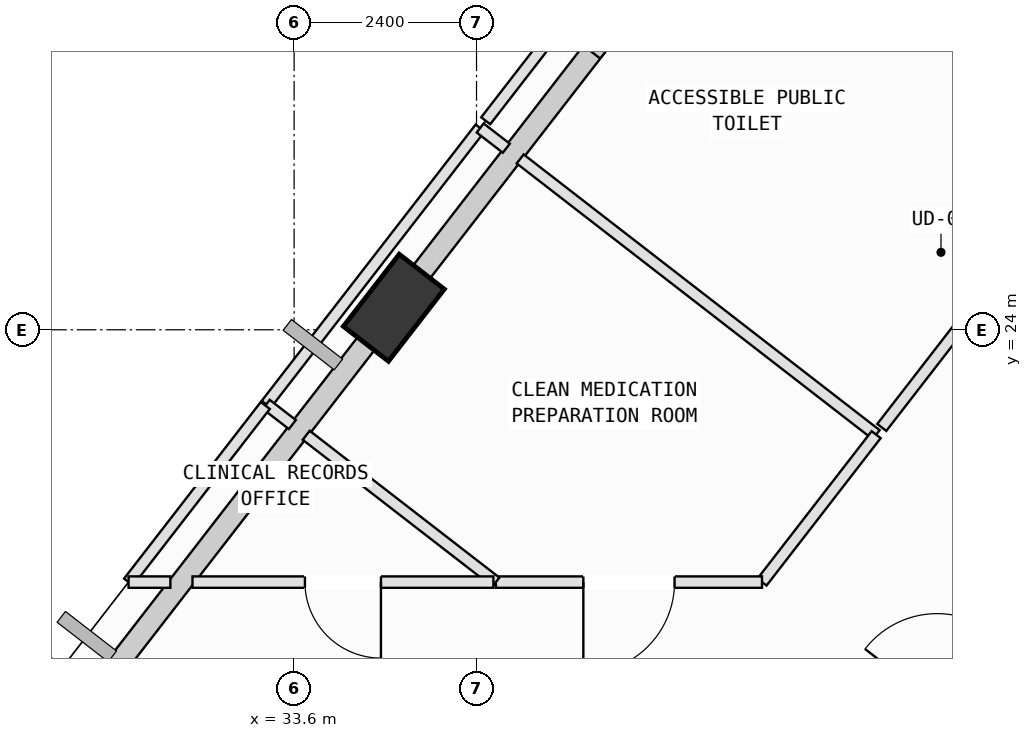
"""IFC4 building model, lengths in metres.
Left out: names, types, materials, properties, quantities, classifications, styles, units other than length and angle.
Written with IfcOpenShell. Run it as: python <this file> out.ifc"""

import sys

from ifc_helpers import new_model, si_unit, direction, frame, frame_2d, origin, origin_2d, place, context, subcontext, project, spatial, rectangle, extrude, element, fill, save


model = new_model("IFC4")
c1 = context("Model", 3, precision=1e-05, world=origin(), true_north=direction((0.0, 1.0)))
c2 = subcontext(c1, "Body", "Model", "MODEL_VIEW")
j1 = project(units=[si_unit("LENGTHUNIT", "METRE"), si_unit("PLANEANGLEUNIT", "RADIAN")], contexts=[c1])
p1 = place(None, origin())
s1 = spatial("IfcSite", under=j1, at=p1, CompositionType="ELEMENT")
p2 = place(p1, origin())
s2 = spatial("IfcBuilding", under=s1, at=p2, CompositionType="ELEMENT")
p3 = place(p2, frame((0.0, 0.0, 247.2)))
s3 = spatial("IfcBuildingStorey", under=s2, at=p3, CompositionType="ELEMENT", Elevation=247.2)
p4 = place(p3, frame((34.912, 24.29, 0.002), z_axis=(0.00207706177, 0.005437014634, 0.9999830622), x_axis=(-0.854072816538, -0.52013310368, 0.00460201124)))
e1 = element("IfcColumn", 1, at=p4, inside=s3, PredefinedType="COLUMN", context=c2, shape_type="SweptSolid", body=[
    extrude(rectangle(XDim=1.2, YDim=0.75, at=origin_2d()), origin(), (0.0, 0.0, 1.0), 3.996),
])
p5 = place(p3, frame((35.163, 24.613, 0.0), z_axis=(0.0, 0.0, 1.0), x_axis=(0.612185484871, 0.790714191167, 0.0)))
e2 = element("IfcWall", 2, at=p5, inside=s3, PredefinedType="SOLIDWALL", context=c2, shape_type="SweptSolid", body=[
    extrude(rectangle(XDim=6.409, YDim=0.28, at=frame_2d((3.205, 0.0))), origin(), (0.0, 0.0, 1.0), 3.265),
])
p6 = place(p5, frame((3.847, 0.0, 0.75)))
e3 = element("IfcOpeningElement", 3, at=p6, cuts=e2, PredefinedType="OPENING", context=c2, shape_type="SweptSolid", body=[
    extrude(rectangle(XDim=1.2, YDim=1.75, at=frame_2d((0.6, 0.875))), frame((0.0, 0.15, 0.0), z_axis=(0.0, -1.0, 0.0), x_axis=(1.0, 0.0, 0.0)), (0.0, 0.0, 1.0), 0.3),
])
p7 = place(p3, frame((30.906, 19.115, 0.0), z_axis=(0.0, 0.0, 1.0), x_axis=(0.612215569716, 0.790690898011, 0.0)))
e4 = element("IfcWall", 4, at=p7, inside=s3, PredefinedType="SOLIDWALL", context=c2, shape_type="SweptSolid", body=[
    extrude(rectangle(XDim=6.158, YDim=0.28, at=frame_2d((3.079, 0.0))), origin(), (0.0, 0.0, 1.0), 3.265),
])
p8 = place(p3, frame((24.885, 23.264, 0.0), z_axis=(0.0, 0.0, 1.0), x_axis=(0.790684257093, -0.612224146523, 0.0)))
e5 = element("IfcWall", 5, at=p8, inside=s3, PredefinedType="SOLIDWALL", context=c2, shape_type="SweptSolid", body=[
    extrude(rectangle(XDim=6.958, YDim=0.28, at=frame_2d((3.479, 0.0))), origin(), (0.0, 0.0, 1.0), 3.165),
])
p9 = place(p3, frame((41.099, 17.824, 0.0), z_axis=(0.0, 0.0, 1.0), x_axis=(0.612151637576, 0.790740395208, 0.0)))
e6 = element("IfcWall", 6, at=p9, inside=s3, PredefinedType="PARTITIONING", context=c2, shape_type="SweptSolid", body=[
    extrude(rectangle(XDim=4.34, YDim=0.15, at=frame_2d((2.17, 0.0))), origin(), (0.0, 0.0, 1.0), 3.78),
])
p10 = place(p9, frame((1.57, 0.0, 0.0)))
e7 = element("IfcOpeningElement", 7, at=p10, cuts=e6, PredefinedType="OPENING", context=c2, shape_type="SweptSolid", body=[
    extrude(rectangle(XDim=1.2, YDim=2.15, at=frame_2d((0.6, 1.075))), frame((0.0, 0.085, 0.0), z_axis=(0.0, -1.0, 0.0), x_axis=(1.0, 0.0, 0.0)), (0.0, 0.0, 1.0), 0.17),
])
p11 = place(p3, frame((33.233, 23.019, 0.0), z_axis=(0.0, 0.0, 1.0), x_axis=(0.612204246351, 0.790699665328, 0.0)))
e8 = element("IfcWall", 8, at=p11, inside=s3, PredefinedType="PARTITIONING", context=c2, shape_type="SweptSolid", body=[
    extrude(rectangle(XDim=4.598, YDim=0.15, at=frame_2d((2.299, 0.0))), origin(), (0.0, 0.0, 1.0), 3.78),
])
p12 = place(p3, frame((36.048, 26.655, 0.0), z_axis=(0.0, 0.0, 1.0), x_axis=(0.790951555594, -0.611878776151, 0.0)))
e9 = element("IfcWall", 9, at=p12, inside=s3, PredefinedType="PARTITIONING", context=c2, shape_type="SweptSolid", body=[
    extrude(rectangle(XDim=0.435, YDim=0.15, at=frame_2d((0.217, 0.0))), origin(), (0.0, 0.0, 1.0), 3.78),
])
p13 = place(p3, frame((36.574, 26.248, 0.0), z_axis=(0.0, 0.0, 1.0), x_axis=(0.790597576491, -0.612336077695, 0.0)))
e10 = element("IfcWall", 10, at=p13, inside=s3, PredefinedType="PARTITIONING", context=c2, shape_type="SweptSolid", body=[
    extrude(rectangle(XDim=5.925, YDim=0.15, at=frame_2d((2.962, 0.0))), origin(), (0.0, 0.0, 1.0), 3.78),
])
p14 = place(p3, frame((41.258, 22.62, 0.0), z_axis=(0.0, 0.0, 1.0), x_axis=(-0.612141082287, -0.790748566472, 0.0)))
e11 = element("IfcWall", 11, at=p14, inside=s3, PredefinedType="PARTITIONING", context=c2, shape_type="SweptSolid", body=[
    extrude(rectangle(XDim=2.454, YDim=0.15, at=frame_2d((1.227, 0.0))), origin(), (0.0, 0.0, 1.0), 3.78),
])
p15 = place(p3, frame((39.756, 20.68, 0.0), z_axis=(0.0, 0.0, 1.0), x_axis=(-1.0, 0.0, 0.0)))
e12 = element("IfcWall", 12, at=p15, inside=s3, PredefinedType="PARTITIONING", context=c2, shape_type="SweptSolid", body=[
    extrude(rectangle(XDim=3.501, YDim=0.15, at=frame_2d((1.75, 0.0))), origin(), (0.0, 0.0, 1.0), 3.415),
])
p16 = place(p15, frame((1.15, 0.0, 0.0)))
e13 = element("IfcOpeningElement", 13, at=p16, cuts=e12, PredefinedType="OPENING", context=c2, shape_type="SweptSolid", body=[
    extrude(rectangle(XDim=1.2, YDim=2.15, at=frame_2d((0.6, 1.075))), frame((0.0, 0.085, 0.0), z_axis=(0.0, -1.0, 0.0), x_axis=(1.0, 0.0, 0.0)), (0.0, 0.0, 1.0), 0.17),
])
p17 = place(p3, frame((36.255, 20.68, 0.0), z_axis=(0.0, 0.0, 1.0), x_axis=(-0.79074544755, 0.612145111211, 0.0)))
e14 = element("IfcWall", 14, at=p17, inside=s3, PredefinedType="PARTITIONING", context=c2, shape_type="SweptSolid", body=[
    extrude(rectangle(XDim=3.156, YDim=0.15, at=frame_2d((1.578, 0.0))), origin(), (0.0, 0.0, 1.0), 3.78),
])
p18 = place(p3, frame((33.577, 22.753, 0.0), z_axis=(0.0, 0.0, 1.0), x_axis=(-0.790951555594, 0.611878776151, 0.0)))
e15 = element("IfcWall", 15, at=p18, inside=s3, PredefinedType="PARTITIONING", context=c2, shape_type="SweptSolid", body=[
    extrude(rectangle(XDim=0.435, YDim=0.15, at=frame_2d((0.217, 0.0))), origin(), (0.0, 0.0, 1.0), 3.78),
])
p19 = place(p3, frame((44.147, 26.35, 0.0), z_axis=(0.0, 0.0, 1.0), x_axis=(-0.612273865453, -0.790645757393, 0.0)))
e16 = element("IfcWall", 16, at=p19, inside=s3, PredefinedType="PARTITIONING", context=c2, shape_type="SweptSolid", body=[
    extrude(rectangle(XDim=4.597, YDim=0.15, at=frame_2d((2.299, 0.0))), origin(), (0.0, 0.0, 1.0), 3.78),
])
p20 = place(p19, frame((1.839, 0.0, 0.0)))
e17 = element("IfcOpeningElement", 17, at=p20, cuts=e16, PredefinedType="OPENING", context=c2, shape_type="SweptSolid", body=[
    extrude(rectangle(XDim=0.92, YDim=2.1, at=frame_2d((0.46, 1.05))), frame((0.0, 0.085, 0.0), z_axis=(0.0, -1.0, 0.0), x_axis=(1.0, 0.0, 0.0)), (0.0, 0.0, 1.0), 0.17),
])
p21 = place(p3, frame((36.121, 26.75, 0.0), z_axis=(0.0, 0.0, 1.0), x_axis=(0.612273865453, 0.790645757393, 0.0)))
e18 = element("IfcWall", 18, at=p21, inside=s3, PredefinedType="PARTITIONING", context=c2, shape_type="SweptSolid", body=[
    extrude(rectangle(XDim=4.597, YDim=0.15, at=frame_2d((2.299, 0.0))), origin(), (0.0, 0.0, 1.0), 3.265),
])
p22 = place(p3, frame((38.936, 30.385, 0.0), z_axis=(0.0, 0.0, 1.0), x_axis=(0.790676851413, -0.6122337108, 0.0)))
e19 = element("IfcWall", 19, at=p22, inside=s3, PredefinedType="PARTITIONING", context=c2, shape_type="SweptSolid", body=[
    extrude(rectangle(XDim=6.591, YDim=0.15, at=frame_2d((3.295, 0.0))), origin(), (0.0, 0.0, 1.0), 3.78),
])
p23 = place(p3, frame((31.422, 20.68, 0.0), z_axis=(0.0, 0.0, 1.0), x_axis=(0.612092763784, 0.790785968846, 0.0)))
e20 = element("IfcWall", 20, at=p23, inside=s3, PredefinedType="PARTITIONING", context=c2, shape_type="SweptSolid", body=[
    extrude(rectangle(XDim=2.939, YDim=0.15, at=frame_2d((1.469, 0.0))), origin(), (0.0, 0.0, 1.0), 3.78),
])
p24 = place(p3, frame((36.222, 20.68, 0.0), z_axis=(0.0, 0.0, 1.0), x_axis=(-1.0, 0.0, 0.0)))
e21 = element("IfcWall", 21, at=p24, inside=s3, PredefinedType="PARTITIONING", context=c2, shape_type="SweptSolid", body=[
    extrude(rectangle(XDim=3.959, YDim=0.15, at=frame_2d((1.979, 0.0))), origin(), (0.0, 0.0, 1.0), 3.415),
])
p25 = place(p24, frame((1.479, 0.0, 0.0)))
e22 = element("IfcOpeningElement", 22, at=p25, cuts=e21, PredefinedType="OPENING", context=c2, shape_type="SweptSolid", body=[
    extrude(rectangle(XDim=1.0, YDim=2.12, at=frame_2d((0.5, 1.06))), frame((0.0, 0.085, 0.0), z_axis=(0.0, -1.0, 0.0), x_axis=(1.0, 0.0, 0.0)), (0.0, 0.0, 1.0), 0.17),
])
p26 = place(p3, frame((31.972, 20.68, 0.0), z_axis=(0.0, 0.0, 1.0), x_axis=(-1.0, 0.0, 0.0)))
e23 = element("IfcWall", 23, at=p26, inside=s3, PredefinedType="PARTITIONING", context=c2, shape_type="SweptSolid", body=[
    extrude(rectangle(XDim=0.55, YDim=0.15, at=frame_2d((0.275, 0.0))), origin(), (0.0, 0.0, 1.0), 3.78),
])
p27 = place(p6, origin())
e24 = element("IfcWindow", 24, at=p27, inside=s3, PartitioningType="SINGLE_PANEL", PredefinedType="WINDOW", context=c2, shape_type="SweptSolid", body=[
    extrude(rectangle(XDim=1.2, YDim=1.75, at=frame_2d((0.6, 0.875))), frame((0.0, 0.03, 0.0), z_axis=(0.0, -1.0, 0.0), x_axis=(1.0, 0.0, 0.0)), (0.0, 0.0, 1.0), 0.06),
])
fill(e3, e24)
p28 = place(p10, origin())
e25 = element("IfcDoor", 25, at=p28, inside=s3, OperationType="SINGLE_SWING_LEFT", PredefinedType="DOOR", context=c2, shape_type="SweptSolid", body=[
    extrude(rectangle(XDim=1.2, YDim=2.15, at=frame_2d((0.6, 1.075))), frame((0.0, 0.025, 0.0), z_axis=(0.0, -1.0, 0.0), x_axis=(1.0, 0.0, 0.0)), (0.0, 0.0, 1.0), 0.05),
])
fill(e7, e25)
p29 = place(p16, origin())
e26 = element("IfcDoor", 26, at=p29, inside=s3, OperationType="SINGLE_SWING_RIGHT", PredefinedType="DOOR", context=c2, shape_type="SweptSolid", body=[
    extrude(rectangle(XDim=1.2, YDim=2.15, at=frame_2d((0.6, 1.075))), frame((0.0, 0.025, 0.0), z_axis=(0.0, -1.0, 0.0), x_axis=(1.0, 0.0, 0.0)), (0.0, 0.0, 1.0), 0.05),
])
fill(e13, e26)
p30 = place(p25, origin())
e27 = element("IfcDoor", 27, at=p30, inside=s3, OperationType="SINGLE_SWING_LEFT", PredefinedType="DOOR", context=c2, shape_type="SweptSolid", body=[
    extrude(rectangle(XDim=1.0, YDim=2.12, at=frame_2d((0.5, 1.06))), frame((0.0, 0.025, 0.0), z_axis=(0.0, -1.0, 0.0), x_axis=(1.0, 0.0, 0.0)), (0.0, 0.0, 1.0), 0.05),
])
fill(e22, e27)
save(model, sys.argv[1])
